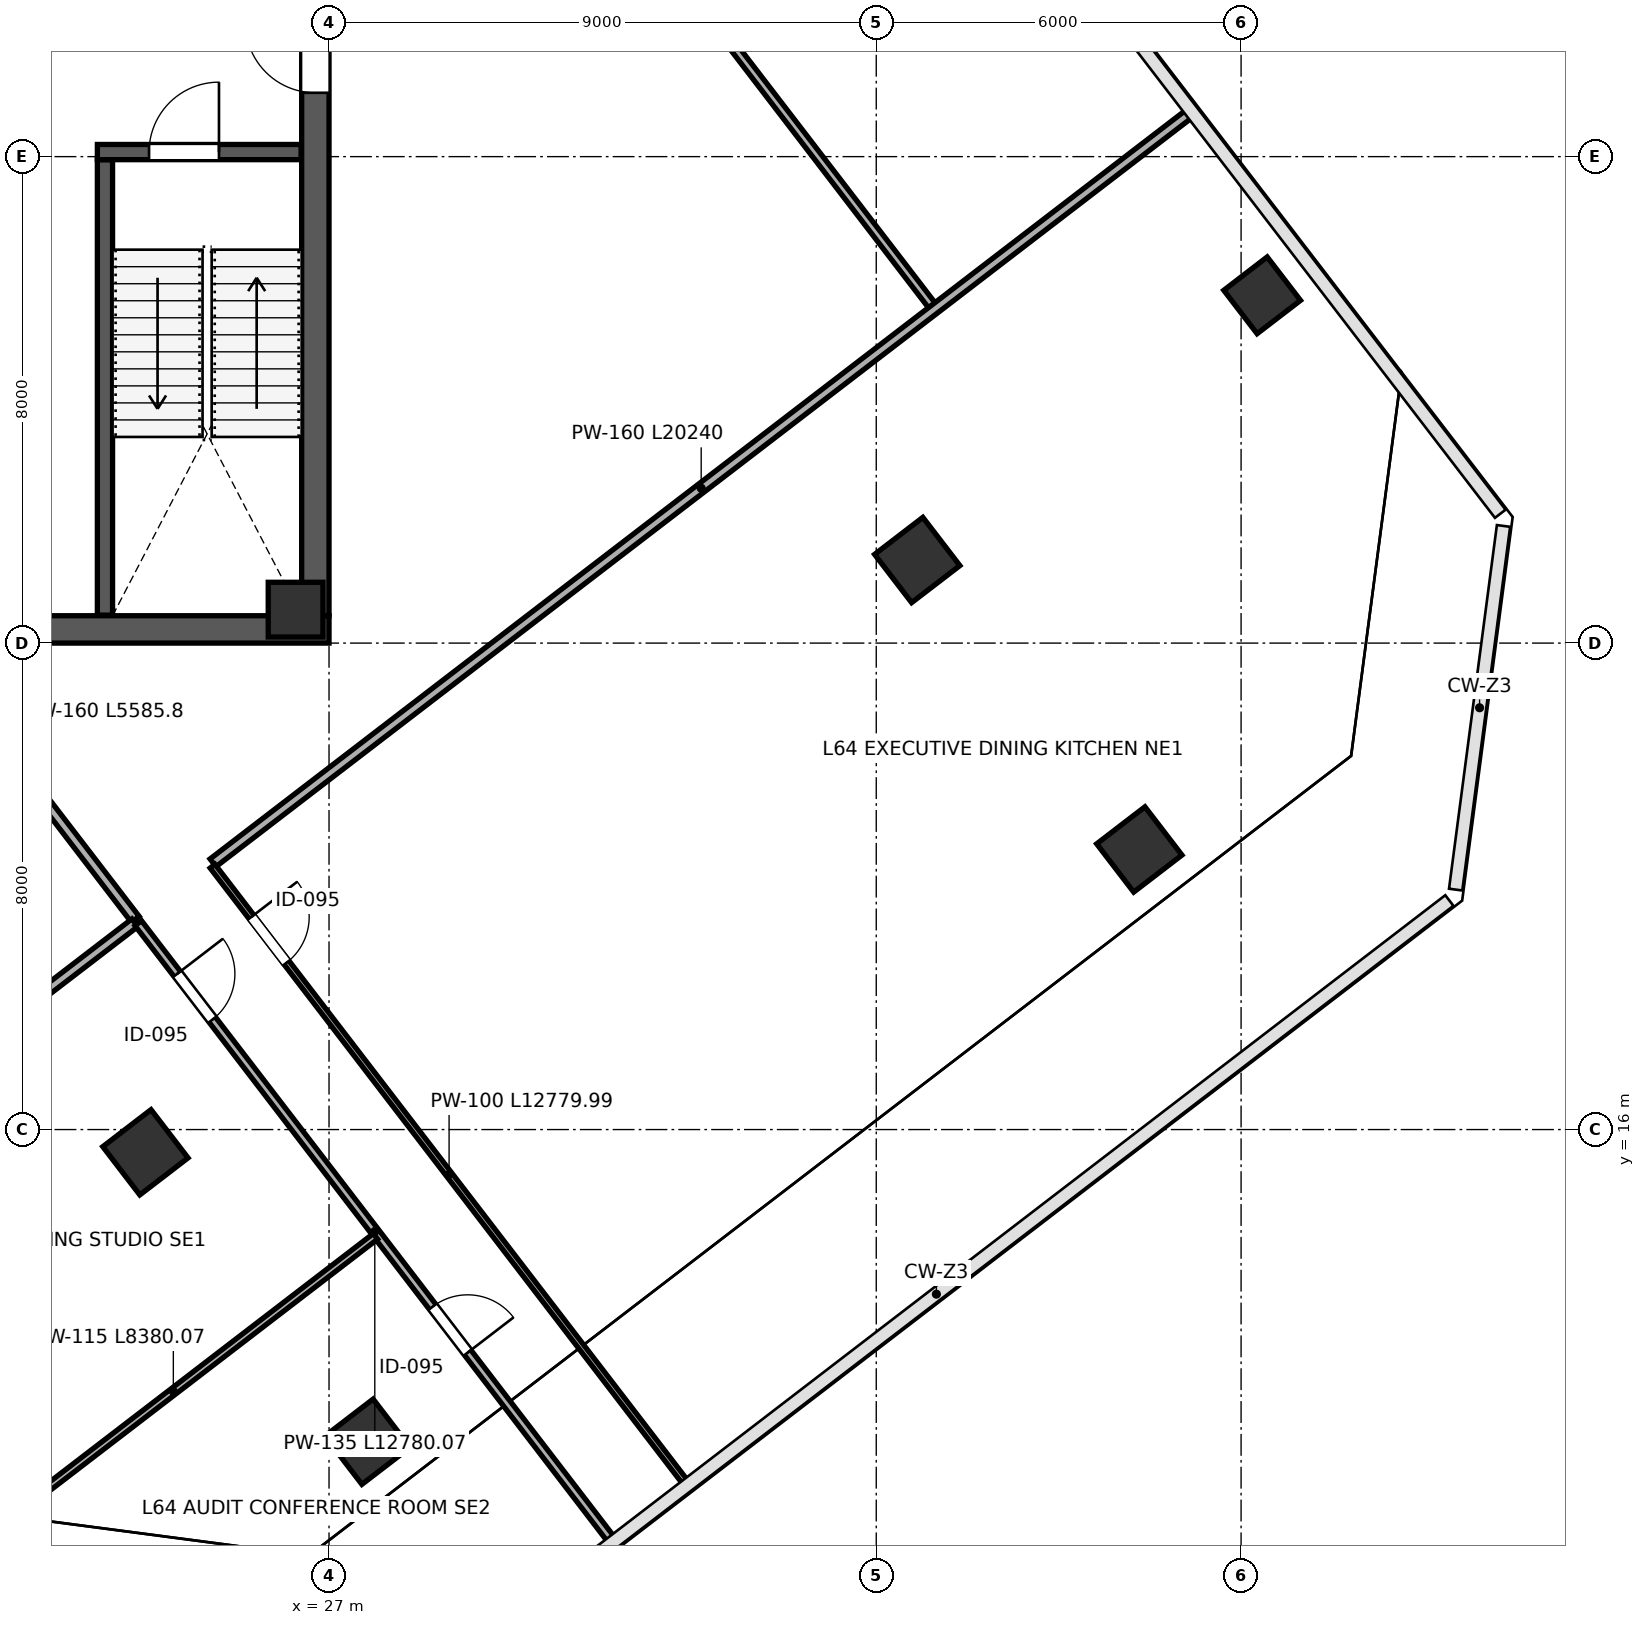
"""IFC4 building model, lengths in metres.
Left out: names, types, materials, properties, quantities, classifications, styles, units other than length and angle.
Written with IfcOpenShell. Run it as: python <this file> out.ifc"""

import sys

from ifc_helpers import new_model, si_unit, direction, frame, frame_2d, origin, origin_2d, place, context, subcontext, project, spatial, rectangle, extrude, source, transform, mapped, element, fill, save


model = new_model("IFC4")
c1 = context("Model", 3, precision=1e-05, world=origin(), true_north=direction((0.0, 1.0)))
c2 = subcontext(c1, "Body", "Model", "MODEL_VIEW")
j1 = project(units=[si_unit("LENGTHUNIT", "METRE"), si_unit("PLANEANGLEUNIT", "RADIAN")], contexts=[c1])
p1 = place(None, origin())
s1 = spatial("IfcSite", under=j1, at=p1, CompositionType="ELEMENT")
p2 = place(p1, origin())
s2 = spatial("IfcBuilding", under=s1, at=p2, CompositionType="ELEMENT")
p3 = place(p2, frame((0.0, 0.0, 283.6)))
s3 = spatial("IfcBuildingStorey", under=s2, at=p3, CompositionType="ELEMENT", Elevation=283.6)
m1 = source(origin(), c2, "Body", "SweptSolid", [
    extrude(rectangle(XDim=0.9, YDim=0.9, at=origin_2d()), origin(), (0.0, 0.0, 1.0), 4.198),
])
p4 = place(p3, frame((26.45, 24.55, 0.001), z_axis=(0.0, 0.0, 1.0), x_axis=(1.0, 0.0, 0.0)))
e1 = element("IfcColumn", 1, at=p4, inside=s3, PredefinedType="COLUMN", context=c2, shape_type="MappedRepresentation", body=[
    mapped(m1, transform((0.0, 0.0, 0.0), scale=1.0)),
])
m2 = source(origin(), c2, "Body", "SweptSolid", [
    extrude(rectangle(XDim=1.0, YDim=1.0, at=origin_2d()), origin(), (0.0, 0.0, 1.0), 4.198),
])
for number, where, z_axis, x_axis in (
    (2, (23.98, 15.626, 0.001), (0.0, 0.0, 1.0), (-0.609, 0.793, 0.0)),
    (3, (36.674, 25.366, 0.001), (0.0, 0.0, 1.0), (-0.609, 0.793, 0.0)),
):
    element("IfcColumn", number, at=place(p3, frame(where, z_axis=z_axis, x_axis=x_axis)), inside=s3, PredefinedType="COLUMN", context=c2, shape_type="MappedRepresentation", body=[
        mapped(m2, transform((0.0, 0.0, 0.0), scale=1.0)),
    ])
m3 = source(origin(), c2, "Body", "SweptSolid", [
    extrude(rectangle(XDim=0.9, YDim=0.9, at=origin_2d()), origin(), (0.0, 0.0, 1.0), 4.198),
])
p5 = place(p3, frame((42.346, 29.719, 0.001), z_axis=(0.0, 0.0, 1.0), x_axis=(-0.608761429009, 0.793353340291, 0.0)))
e4 = element("IfcColumn", 4, at=p5, inside=s3, PredefinedType="COLUMN", context=c2, shape_type="MappedRepresentation", body=[
    mapped(m3, transform((0.0, 0.0, 0.0), scale=1.0)),
])
m4 = source(origin(), c2, "Body", "SweptSolid", [
    extrude(rectangle(XDim=1.0, YDim=1.0, at=origin_2d()), origin(), (0.0, 0.0, 1.0), 4.198),
])
for number, where, z_axis, x_axis in (
    (5, (27.633, 10.866, 0.001), (0.0, 0.0, 1.0), (-0.609, 0.793, 0.0)),
    (6, (40.326, 20.606, 0.001), (0.0, 0.0, 1.0), (-0.609, 0.793, 0.0)),
):
    element("IfcColumn", number, at=place(p3, frame(where, z_axis=z_axis, x_axis=x_axis)), inside=s3, PredefinedType="COLUMN", context=c2, shape_type="MappedRepresentation", body=[
        mapped(m4, transform((0.0, 0.0, 0.0), scale=1.0)),
    ])
p6 = place(p3, frame((26.775, 24.45, 0.0), z_axis=(0.0, 0.0, 1.0), x_axis=(0.0, 1.0, 0.0)))
e7 = element("IfcWall", 7, at=p6, inside=s3, PredefinedType="SHEAR", context=c2, shape_type="SweptSolid", body=[
    extrude(rectangle(XDim=15.1, YDim=0.45, at=frame_2d((7.55, 0.0))), origin(), (0.0, 0.0, 1.0), 3.92),
])
p7 = place(p6, frame((8.6, 0.0, 0.0)))
e8 = element("IfcOpeningElement", 8, at=p7, cuts=e7, PredefinedType="OPENING", context=c2, shape_type="SweptSolid", body=[
    extrude(rectangle(XDim=1.15, YDim=2.2, at=frame_2d((0.575, 1.1))), frame((0.0, 0.235, 0.0), z_axis=(0.0, -1.0, 0.0), x_axis=(1.0, 0.0, 0.0)), (0.0, 0.0, 1.0), 0.47),
])
p8 = place(p3, frame((9.0, 24.225, 0.0), z_axis=(0.0, 0.0, 1.0), x_axis=(1.0, 0.0, 0.0)))
e9 = element("IfcWall", 9, at=p8, inside=s3, PredefinedType="SHEAR", context=c2, shape_type="SweptSolid", body=[
    extrude(rectangle(XDim=18.0, YDim=0.45, at=frame_2d((9.0, 0.0))), origin(), (0.0, 0.0, 1.0), 3.92),
])
p9 = place(p3, frame((23.315, 24.46, 0.0), z_axis=(0.0, 0.0, 1.0), x_axis=(0.0, 1.0, 0.0)))
e10 = element("IfcWall", 10, at=p9, inside=s3, PredefinedType="SHEAR", context=c2, shape_type="SweptSolid", body=[
    extrude(rectangle(XDim=7.49, YDim=0.25, at=frame_2d((3.745, 0.0))), origin(), (0.0, 0.0, 1.0), 3.92),
])
p10 = place(p3, frame((23.19, 32.075, 0.0), z_axis=(0.0, 0.0, 1.0), x_axis=(1.0, 0.0, 0.0)))
e11 = element("IfcWall", 11, at=p10, inside=s3, PredefinedType="SHEAR", context=c2, shape_type="SweptSolid", body=[
    extrude(rectangle(XDim=3.35, YDim=0.25, at=frame_2d((1.675, 0.0))), origin(), (0.0, 0.0, 1.0), 3.92),
])
p11 = place(p10, frame((0.85, 0.0, 0.0)))
e12 = element("IfcOpeningElement", 12, at=p11, cuts=e11, PredefinedType="OPENING", context=c2, shape_type="SweptSolid", body=[
    extrude(rectangle(XDim=1.15, YDim=2.2, at=frame_2d((0.575, 1.1))), frame((0.0, 0.135, 0.0), z_axis=(0.0, -1.0, 0.0), x_axis=(1.0, 0.0, 0.0)), (0.0, 0.0, 1.0), 0.27),
])
p12 = place(p3, frame((20.414, 23.888, 0.0), z_axis=(0.0, 0.0, 1.0), x_axis=(0.608740736079, -0.793369218106, 0.0)))
e13 = element("IfcWall", 13, at=p12, inside=s3, PredefinedType="PARTITIONING", context=c2, shape_type="SweptSolid", body=[
    extrude(rectangle(XDim=5.585, YDim=0.16, at=frame_2d((2.793, 0.0))), origin(), (0.0, 0.0, 1.0), 3.92),
])
p13 = place(p3, frame((20.518, 50.922, 0.0), z_axis=(0.0, 0.0, 1.0), x_axis=(0.608759693778, -0.793354671778, 0.0)))
e14 = element("IfcWall", 14, at=p13, inside=s3, PredefinedType="PARTITIONING", context=c2, shape_type="SweptSolid", body=[
    extrude(rectangle(XDim=26.97, YDim=0.135, at=frame_2d((13.485, 0.0))), origin(), (0.0, 0.0, 1.0), 3.92),
])
p14 = place(p13, frame((5.4, 0.0, 0.0)))
e15 = element("IfcOpeningElement", 15, at=p14, cuts=e14, PredefinedType="OPENING", context=c2, shape_type="SweptSolid", body=[
    extrude(rectangle(XDim=0.95, YDim=2.15, at=frame_2d((0.475, 1.075))), frame((0.0, 0.078, 0.0), z_axis=(0.0, -1.0, 0.0), x_axis=(1.0, 0.0, 0.0)), (0.0, 0.0, 1.0), 0.155),
])
p15 = place(p3, frame((25.092, 20.387, 0.0), z_axis=(0.0, 0.0, 1.0), x_axis=(0.793357014217, 0.608756641025, 0.0)))
e16 = element("IfcWall", 16, at=p15, inside=s3, PredefinedType="PARTITIONING", context=c2, shape_type="SweptSolid", body=[
    extrude(rectangle(XDim=20.24, YDim=0.16, at=frame_2d((10.12, 0.0))), origin(), (0.0, 0.0, 1.0), 3.155),
])
p16 = place(p3, frame((15.935, 13.361, 0.0), z_axis=(0.0, 0.0, 1.0), x_axis=(0.793355203048, 0.608759001409, 0.0)))
e17 = element("IfcWall", 17, at=p16, inside=s3, PredefinedType="PARTITIONING", context=c2, shape_type="SweptSolid", body=[
    extrude(rectangle(XDim=9.922, YDim=0.16, at=frame_2d((4.961, 0.0))), origin(), (0.0, 0.0, 1.0), 3.92),
])
p17 = place(p3, frame((25.085, 20.331, 0.0), z_axis=(0.0, 0.0, 1.0), x_axis=(0.608748325205, -0.793363395022, 0.0)))
e18 = element("IfcWall", 18, at=p17, inside=s3, PredefinedType="PARTITIONING", context=c2, shape_type="SweptSolid", body=[
    extrude(rectangle(XDim=12.78, YDim=0.1, at=frame_2d((6.39, 0.0))), origin(), (0.0, 0.0, 1.0), 3.212),
])
p18 = place(p17, frame((1.05, 0.0, 0.0)))
e19 = element("IfcOpeningElement", 19, at=p18, cuts=e18, PredefinedType="OPENING", context=c2, shape_type="SweptSolid", body=[
    extrude(rectangle(XDim=0.95, YDim=2.15, at=frame_2d((0.475, 1.075))), frame((0.0, 0.06, 0.0), z_axis=(0.0, -1.0, 0.0), x_axis=(1.0, 0.0, 0.0)), (0.0, 0.0, 1.0), 0.12),
])
p19 = place(p3, frame((23.863, 19.393, 0.0), z_axis=(0.0, 0.0, 1.0), x_axis=(0.608748325205, -0.793363395022, 0.0)))
e20 = element("IfcWall", 20, at=p19, inside=s3, PredefinedType="PARTITIONING", context=c2, shape_type="SweptSolid", body=[
    extrude(rectangle(XDim=12.78, YDim=0.135, at=frame_2d((6.39, 0.0))), origin(), (0.0, 0.0, 1.0), 3.212),
])
p20 = place(p19, frame((1.05, 0.0, 0.0)))
e21 = element("IfcOpeningElement", 21, at=p20, cuts=e20, PredefinedType="OPENING", context=c2, shape_type="SweptSolid", body=[
    extrude(rectangle(XDim=0.95, YDim=2.15, at=frame_2d((0.475, 1.075))), frame((0.0, 0.078, 0.0), z_axis=(0.0, -1.0, 0.0), x_axis=(1.0, 0.0, 0.0)), (0.0, 0.0, 1.0), 0.155),
])
p21 = place(p19, frame((7.95, 0.0, 0.0)))
e22 = element("IfcOpeningElement", 22, at=p21, cuts=e20, PredefinedType="OPENING", context=c2, shape_type="SweptSolid", body=[
    extrude(rectangle(XDim=0.95, YDim=2.15, at=frame_2d((0.475, 1.075))), frame((0.0, 0.078, 0.0), z_axis=(0.0, -1.0, 0.0), x_axis=(1.0, 0.0, 0.0)), (0.0, 0.0, 1.0), 0.155),
])
p22 = place(p3, frame((21.115, 9.142, 0.0), z_axis=(0.0, 0.0, 1.0), x_axis=(0.793351209169, 0.608764206331, 0.0)))
e23 = element("IfcWall", 23, at=p22, inside=s3, PredefinedType="PARTITIONING", context=c2, shape_type="SweptSolid", body=[
    extrude(rectangle(XDim=8.38, YDim=0.115, at=frame_2d((4.19, 0.0))), origin(), (0.0, 0.0, 1.0), 3.92),
])
m5 = source(origin(), c2, "Body", "SweptSolid", [
    extrude(rectangle(XDim=1.15, YDim=2.2, at=frame_2d((0.575, 1.1))), frame((0.0, 0.025, 0.0), z_axis=(0.0, -1.0, 0.0), x_axis=(1.0, 0.0, 0.0)), (0.0, 0.0, 1.0), 0.05),
])
p23 = place(p11, origin())
e24 = element("IfcDoor", 24, at=p23, inside=s3, OperationType="SINGLE_SWING_RIGHT", PredefinedType="DOOR", context=c2, shape_type="MappedRepresentation", body=[
    mapped(m5, transform((0.0, 0.0, 0.0), scale=1.0)),
])
fill(e12, e24)
m6 = source(origin(), c2, "Body", "SweptSolid", [
    extrude(rectangle(XDim=1.15, YDim=2.2, at=frame_2d((0.575, 1.1))), frame((0.0, 0.025, 0.0), z_axis=(0.0, -1.0, 0.0), x_axis=(1.0, 0.0, 0.0)), (0.0, 0.0, 1.0), 0.05),
])
p24 = place(p7, origin())
e25 = element("IfcDoor", 25, at=p24, inside=s3, OperationType="SINGLE_SWING_RIGHT", PredefinedType="DOOR", context=c2, shape_type="MappedRepresentation", body=[
    mapped(m6, transform((0.0, 0.0, 0.0), scale=1.0)),
])
fill(e8, e25)
m7 = source(origin(), c2, "Body", "SweptSolid", [
    extrude(rectangle(XDim=0.95, YDim=2.15, at=frame_2d((0.475, 1.075))), frame((0.0, 0.025, 0.0), z_axis=(0.0, -1.0, 0.0), x_axis=(1.0, 0.0, 0.0)), (0.0, 0.0, 1.0), 0.05),
])
p25 = place(p18, origin())
e26 = element("IfcDoor", 26, at=p25, inside=s3, OperationType="SINGLE_SWING_LEFT", PredefinedType="DOOR", context=c2, shape_type="MappedRepresentation", body=[
    mapped(m7, transform((0.0, 0.0, 0.0), scale=1.0)),
])
fill(e19, e26)
p26 = place(p20, origin())
e27 = element("IfcDoor", 27, at=p26, inside=s3, OperationType="SINGLE_SWING_LEFT", PredefinedType="DOOR", context=c2, shape_type="MappedRepresentation", body=[
    mapped(m7, transform((0.0, 0.0, 0.0), scale=1.0)),
])
fill(e21, e27)
p27 = place(p21, origin())
e28 = element("IfcDoor", 28, at=p27, inside=s3, OperationType="SINGLE_SWING_RIGHT", PredefinedType="DOOR", context=c2, shape_type="MappedRepresentation", body=[
    mapped(m7, transform((0.0, 0.0, 0.0), scale=1.0)),
])
fill(e22, e28)
save(model, sys.argv[1])
